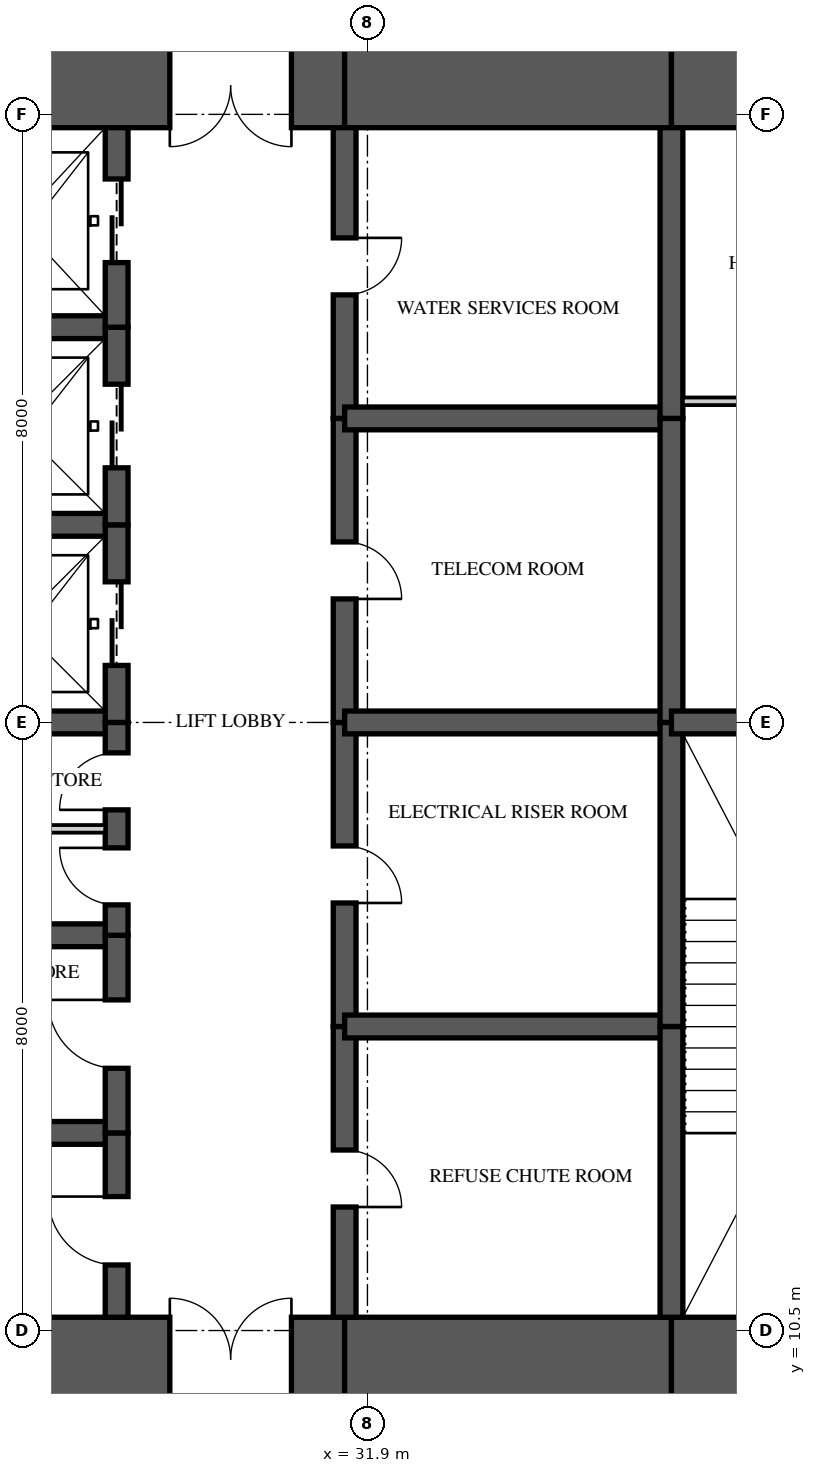
"""IFC4 building model, lengths in metres.
Left out: names, types, materials, properties, quantities, classifications, styles, units other than length and angle.
Written with IfcOpenShell. Run it as: python <this file> out.ifc"""

import sys

from ifc_helpers import new_model, si_unit, direction, frame, frame_2d, origin, place, context, subcontext, project, spatial, rectangle, extrude, element, fill, save


model = new_model("IFC4")
c1 = context("Model", 3, precision=1e-05, world=origin(), true_north=direction((0.0, 1.0)))
c2 = subcontext(c1, "Body", "Model", "MODEL_VIEW")
j1 = project(units=[si_unit("LENGTHUNIT", "METRE"), si_unit("PLANEANGLEUNIT", "RADIAN")], contexts=[c1])
p1 = place(None, origin())
s1 = spatial("IfcSite", under=j1, at=p1, CompositionType="ELEMENT")
p2 = place(p1, origin())
s2 = spatial("IfcBuilding", under=s1, at=p2, CompositionType="ELEMENT")
p3 = place(p2, frame((0.0, 0.0, 231.95)))
s3 = spatial("IfcBuildingStorey", under=s2, at=p3, CompositionType="ELEMENT", Elevation=231.95)
p4 = place(p3, frame((26.0, 10.125, 0.0), z_axis=(0.0, 0.0, 1.0), x_axis=(1.0, 0.0, 0.0)))
e1 = element("IfcWall", 1, at=p4, inside=s3, PredefinedType="SHEAR", context=c2, shape_type="SweptSolid", body=[
    extrude(rectangle(XDim=5.6, YDim=1.1, at=frame_2d((2.8, 0.0))), origin(), (0.0, 0.0, 1.0), 3.5),
])
p5 = place(p4, frame((3.3, 0.0, 0.0)))
e2 = element("IfcOpeningElement", 2, at=p5, cuts=e1, PredefinedType="OPENING", context=c2, shape_type="SweptSolid", body=[
    extrude(rectangle(XDim=1.6, YDim=2.1, at=frame_2d((0.8, 1.05))), frame((0.0, 0.56, 0.0), z_axis=(0.0, -1.0, 0.0), x_axis=(1.0, 0.0, 0.0)), (0.0, 0.0, 1.0), 1.12),
])
p6 = place(p3, frame((31.6, 10.125, 0.0), z_axis=(0.0, 0.0, 1.0), x_axis=(1.0, 0.0, 0.0)))
e3 = element("IfcWall", 3, at=p6, inside=s3, PredefinedType="SHEAR", context=c2, shape_type="SweptSolid", body=[
    extrude(rectangle(XDim=4.3, YDim=1.1, at=frame_2d((2.15, 0.0))), origin(), (0.0, 0.0, 1.0), 3.5),
])
p7 = place(p3, frame((35.9, 10.125, 0.0), z_axis=(0.0, 0.0, 1.0), x_axis=(1.0, 0.0, 0.0)))
e4 = element("IfcWall", 4, at=p7, inside=s3, PredefinedType="SHEAR", context=c2, shape_type="SweptSolid", body=[
    extrude(rectangle(XDim=8.175, YDim=1.1, at=frame_2d((4.087, 0.0))), origin(), (0.0, 0.0, 1.0), 3.5),
])
p8 = place(p7, frame((2.7, 0.0, 0.0)))
e5 = element("IfcOpeningElement", 5, at=p8, cuts=e4, PredefinedType="OPENING", context=c2, shape_type="SweptSolid", body=[
    extrude(rectangle(XDim=1.0, YDim=2.1, at=frame_2d((0.5, 1.05))), frame((0.0, 0.56, 0.0), z_axis=(0.0, -1.0, 0.0), x_axis=(1.0, 0.0, 0.0)), (0.0, 0.0, 1.0), 1.12),
])
p9 = place(p3, frame((44.075, 26.875, 0.0), z_axis=(0.0, 0.0, 1.0), x_axis=(-1.0, 0.0, 0.0)))
e6 = element("IfcWall", 6, at=p9, inside=s3, PredefinedType="SHEAR", context=c2, shape_type="SweptSolid", body=[
    extrude(rectangle(XDim=8.175, YDim=1.1, at=frame_2d((4.087, 0.0))), origin(), (0.0, 0.0, 1.0), 3.5),
])
p10 = place(p9, frame((5.575, 0.0, 0.0)))
e7 = element("IfcOpeningElement", 7, at=p10, cuts=e6, PredefinedType="OPENING", context=c2, shape_type="SweptSolid", body=[
    extrude(rectangle(XDim=0.9, YDim=2.1, at=frame_2d((0.45, 1.05))), frame((0.0, 0.56, 0.0), z_axis=(0.0, -1.0, 0.0), x_axis=(1.0, 0.0, 0.0)), (0.0, 0.0, 1.0), 1.12),
])
p11 = place(p3, frame((35.9, 26.875, 0.0), z_axis=(0.0, 0.0, 1.0), x_axis=(-1.0, 0.0, 0.0)))
e8 = element("IfcWall", 8, at=p11, inside=s3, PredefinedType="SHEAR", context=c2, shape_type="SweptSolid", body=[
    extrude(rectangle(XDim=4.3, YDim=1.1, at=frame_2d((2.15, 0.0))), origin(), (0.0, 0.0, 1.0), 3.5),
])
p12 = place(p3, frame((31.6, 26.875, 0.0), z_axis=(0.0, 0.0, 1.0), x_axis=(-1.0, 0.0, 0.0)))
e9 = element("IfcWall", 9, at=p12, inside=s3, PredefinedType="SHEAR", context=c2, shape_type="SweptSolid", body=[
    extrude(rectangle(XDim=5.6, YDim=1.1, at=frame_2d((2.8, 0.0))), origin(), (0.0, 0.0, 1.0), 3.5),
])
p13 = place(p12, frame((0.7, 0.0, 0.0)))
e10 = element("IfcOpeningElement", 10, at=p13, cuts=e9, PredefinedType="OPENING", context=c2, shape_type="SweptSolid", body=[
    extrude(rectangle(XDim=1.6, YDim=2.1, at=frame_2d((0.8, 1.05))), frame((0.0, 0.56, 0.0), z_axis=(0.0, -1.0, 0.0), x_axis=(1.0, 0.0, 0.0)), (0.0, 0.0, 1.0), 1.12),
])
p14 = place(p3, frame((28.6, 10.675, 0.0), z_axis=(0.0, 0.0, 1.0), x_axis=(0.0, 1.0, 0.0)))
e11 = element("IfcWall", 11, at=p14, inside=s3, PredefinedType="SHEAR", context=c2, shape_type="SweptSolid", body=[
    extrude(rectangle(XDim=2.425, YDim=0.3, at=frame_2d((1.212, 0.0))), origin(), (0.0, 0.0, 1.0), 3.5),
])
p15 = place(p14, frame((0.688, 0.0, 0.0)))
e12 = element("IfcOpeningElement", 12, at=p15, cuts=e11, PredefinedType="OPENING", context=c2, shape_type="SweptSolid", body=[
    extrude(rectangle(XDim=0.9, YDim=2.1, at=frame_2d((0.45, 1.05))), frame((0.0, 0.16, 0.0), z_axis=(0.0, -1.0, 0.0), x_axis=(1.0, 0.0, 0.0)), (0.0, 0.0, 1.0), 0.32),
])
p16 = place(p3, frame((28.6, 13.1, 0.0), z_axis=(0.0, 0.0, 1.0), x_axis=(0.0, 1.0, 0.0)))
e13 = element("IfcWall", 13, at=p16, inside=s3, PredefinedType="SHEAR", context=c2, shape_type="SweptSolid", body=[
    extrude(rectangle(XDim=2.6, YDim=0.3, at=frame_2d((1.3, 0.0))), origin(), (0.0, 0.0, 1.0), 3.5),
])
p17 = place(p16, frame((0.85, 0.0, 0.0)))
e14 = element("IfcOpeningElement", 14, at=p17, cuts=e13, PredefinedType="OPENING", context=c2, shape_type="SweptSolid", body=[
    extrude(rectangle(XDim=0.9, YDim=2.1, at=frame_2d((0.45, 1.05))), frame((0.0, 0.16, 0.0), z_axis=(0.0, -1.0, 0.0), x_axis=(1.0, 0.0, 0.0)), (0.0, 0.0, 1.0), 0.32),
])
p18 = place(p3, frame((28.6, 15.7, 0.0), z_axis=(0.0, 0.0, 1.0), x_axis=(0.0, 1.0, 0.0)))
e15 = element("IfcWall", 15, at=p18, inside=s3, PredefinedType="SHEAR", context=c2, shape_type="SweptSolid", body=[
    extrude(rectangle(XDim=2.8, YDim=0.3, at=frame_2d((1.4, 0.0))), origin(), (0.0, 0.0, 1.0), 3.5),
])
p19 = place(p18, frame((0.4, 0.0, 0.0)))
e16 = element("IfcOpeningElement", 16, at=p19, cuts=e15, PredefinedType="OPENING", context=c2, shape_type="SweptSolid", body=[
    extrude(rectangle(XDim=0.75, YDim=2.1, at=frame_2d((0.375, 1.05))), frame((0.0, 0.16, 0.0), z_axis=(0.0, -1.0, 0.0), x_axis=(1.0, 0.0, 0.0)), (0.0, 0.0, 1.0), 0.32),
])
p20 = place(p18, frame((1.65, 0.0, 0.0)))
e17 = element("IfcOpeningElement", 17, at=p20, cuts=e15, PredefinedType="OPENING", context=c2, shape_type="SweptSolid", body=[
    extrude(rectangle(XDim=0.75, YDim=2.1, at=frame_2d((0.375, 1.05))), frame((0.0, 0.16, 0.0), z_axis=(0.0, -1.0, 0.0), x_axis=(1.0, 0.0, 0.0)), (0.0, 0.0, 1.0), 0.32),
])
p21 = place(p3, frame((28.6, 18.5, 0.0), z_axis=(0.0, 0.0, 1.0), x_axis=(0.0, 1.0, 0.0)))
e18 = element("IfcWall", 18, at=p21, inside=s3, PredefinedType="SHEAR", context=c2, shape_type="SweptSolid", body=[
    extrude(rectangle(XDim=2.6, YDim=0.3, at=frame_2d((1.3, 0.0))), origin(), (0.0, 0.0, 1.0), 3.5),
])
p22 = place(p21, frame((0.75, 0.0, 0.0)))
e19 = element("IfcOpeningElement", 19, at=p22, cuts=e18, PredefinedType="OPENING", context=c2, shape_type="SweptSolid", body=[
    extrude(rectangle(XDim=1.1, YDim=2.1, at=frame_2d((0.55, 1.05))), frame((0.0, 0.16, 0.0), z_axis=(0.0, -1.0, 0.0), x_axis=(1.0, 0.0, 0.0)), (0.0, 0.0, 1.0), 0.32),
])
p23 = place(p3, frame((28.6, 21.1, 0.0), z_axis=(0.0, 0.0, 1.0), x_axis=(0.0, 1.0, 0.0)))
e20 = element("IfcWall", 20, at=p23, inside=s3, PredefinedType="SHEAR", context=c2, shape_type="SweptSolid", body=[
    extrude(rectangle(XDim=2.6, YDim=0.3, at=frame_2d((1.3, 0.0))), origin(), (0.0, 0.0, 1.0), 3.5),
])
p24 = place(p23, frame((0.75, 0.0, 0.0)))
e21 = element("IfcOpeningElement", 21, at=p24, cuts=e20, PredefinedType="OPENING", context=c2, shape_type="SweptSolid", body=[
    extrude(rectangle(XDim=1.1, YDim=2.1, at=frame_2d((0.55, 1.05))), frame((0.0, 0.16, 0.0), z_axis=(0.0, -1.0, 0.0), x_axis=(1.0, 0.0, 0.0)), (0.0, 0.0, 1.0), 0.32),
])
p25 = place(p3, frame((28.6, 23.7, 0.0), z_axis=(0.0, 0.0, 1.0), x_axis=(0.0, 1.0, 0.0)))
e22 = element("IfcWall", 22, at=p25, inside=s3, PredefinedType="SHEAR", context=c2, shape_type="SweptSolid", body=[
    extrude(rectangle(XDim=2.625, YDim=0.3, at=frame_2d((1.312, 0.0))), origin(), (0.0, 0.0, 1.0), 3.5),
])
p26 = place(p25, frame((0.85, 0.0, 0.0)))
e23 = element("IfcOpeningElement", 23, at=p26, cuts=e22, PredefinedType="OPENING", context=c2, shape_type="SweptSolid", body=[
    extrude(rectangle(XDim=1.1, YDim=2.1, at=frame_2d((0.55, 1.05))), frame((0.0, 0.16, 0.0), z_axis=(0.0, -1.0, 0.0), x_axis=(1.0, 0.0, 0.0)), (0.0, 0.0, 1.0), 0.32),
])
p27 = place(p3, frame((31.6, 10.675, 0.0), z_axis=(0.0, 0.0, 1.0), x_axis=(0.0, 1.0, 0.0)))
e24 = element("IfcWall", 24, at=p27, inside=s3, PredefinedType="SHEAR", context=c2, shape_type="SweptSolid", body=[
    extrude(rectangle(XDim=3.825, YDim=0.3, at=frame_2d((1.913, 0.0))), origin(), (0.0, 0.0, 1.0), 3.5),
])
p28 = place(p27, frame((1.45, 0.0, 0.0)))
e25 = element("IfcOpeningElement", 25, at=p28, cuts=e24, PredefinedType="OPENING", context=c2, shape_type="SweptSolid", body=[
    extrude(rectangle(XDim=0.75, YDim=2.1, at=frame_2d((0.375, 1.05))), frame((0.0, 0.16, 0.0), z_axis=(0.0, -1.0, 0.0), x_axis=(1.0, 0.0, 0.0)), (0.0, 0.0, 1.0), 0.32),
])
p29 = place(p3, frame((31.6, 14.5, 0.0), z_axis=(0.0, 0.0, 1.0), x_axis=(0.0, 1.0, 0.0)))
e26 = element("IfcWall", 26, at=p29, inside=s3, PredefinedType="SHEAR", context=c2, shape_type="SweptSolid", body=[
    extrude(rectangle(XDim=4.0, YDim=0.3, at=frame_2d((2.0, 0.0))), origin(), (0.0, 0.0, 1.0), 3.5),
])
p30 = place(p29, frame((1.625, 0.0, 0.0)))
e27 = element("IfcOpeningElement", 27, at=p30, cuts=e26, PredefinedType="OPENING", context=c2, shape_type="SweptSolid", body=[
    extrude(rectangle(XDim=0.75, YDim=2.1, at=frame_2d((0.375, 1.05))), frame((0.0, 0.16, 0.0), z_axis=(0.0, -1.0, 0.0), x_axis=(1.0, 0.0, 0.0)), (0.0, 0.0, 1.0), 0.32),
])
p31 = place(p3, frame((31.6, 18.5, 0.0), z_axis=(0.0, 0.0, 1.0), x_axis=(0.0, 1.0, 0.0)))
e28 = element("IfcWall", 28, at=p31, inside=s3, PredefinedType="SHEAR", context=c2, shape_type="SweptSolid", body=[
    extrude(rectangle(XDim=4.0, YDim=0.3, at=frame_2d((2.0, 0.0))), origin(), (0.0, 0.0, 1.0), 3.5),
])
p32 = place(p31, frame((1.625, 0.0, 0.0)))
e29 = element("IfcOpeningElement", 29, at=p32, cuts=e28, PredefinedType="OPENING", context=c2, shape_type="SweptSolid", body=[
    extrude(rectangle(XDim=0.75, YDim=2.1, at=frame_2d((0.375, 1.05))), frame((0.0, 0.16, 0.0), z_axis=(0.0, -1.0, 0.0), x_axis=(1.0, 0.0, 0.0)), (0.0, 0.0, 1.0), 0.32),
])
p33 = place(p3, frame((31.6, 22.5, 0.0), z_axis=(0.0, 0.0, 1.0), x_axis=(0.0, 1.0, 0.0)))
e30 = element("IfcWall", 30, at=p33, inside=s3, PredefinedType="SHEAR", context=c2, shape_type="SweptSolid", body=[
    extrude(rectangle(XDim=3.825, YDim=0.3, at=frame_2d((1.913, 0.0))), origin(), (0.0, 0.0, 1.0), 3.5),
])
p34 = place(p33, frame((1.625, 0.0, 0.0)))
e31 = element("IfcOpeningElement", 31, at=p34, cuts=e30, PredefinedType="OPENING", context=c2, shape_type="SweptSolid", body=[
    extrude(rectangle(XDim=0.75, YDim=2.1, at=frame_2d((0.375, 1.05))), frame((0.0, 0.16, 0.0), z_axis=(0.0, -1.0, 0.0), x_axis=(1.0, 0.0, 0.0)), (0.0, 0.0, 1.0), 0.32),
])
p35 = place(p3, frame((35.9, 10.675, 0.0), z_axis=(0.0, 0.0, 1.0), x_axis=(0.0, 1.0, 0.0)))
e32 = element("IfcWall", 32, at=p35, inside=s3, PredefinedType="SHEAR", context=c2, shape_type="SweptSolid", body=[
    extrude(rectangle(XDim=3.825, YDim=0.3, at=frame_2d((1.913, 0.0))), origin(), (0.0, 0.0, 1.0), 3.5),
])
for number, where, z_axis, x_axis in (
    (33, (35.9, 14.5, 0.0), (0.0, 0.0, 1.0), (0.0, 1.0, 0.0)),
    (34, (35.9, 18.5, 0.0), (0.0, 0.0, 1.0), (0.0, 1.0, 0.0)),
):
    element("IfcWall", number, at=place(p3, frame(where, z_axis=z_axis, x_axis=x_axis)), inside=s3, PredefinedType="SHEAR", context=c2, shape_type="SweptSolid", body=[
        extrude(rectangle(XDim=4.0, YDim=0.3, at=frame_2d((2.0, 0.0))), origin(), (0.0, 0.0, 1.0), 3.5),
    ])
p36 = place(p3, frame((35.9, 22.5, 0.0), z_axis=(0.0, 0.0, 1.0), x_axis=(0.0, 1.0, 0.0)))
e35 = element("IfcWall", 35, at=p36, inside=s3, PredefinedType="SHEAR", context=c2, shape_type="SweptSolid", body=[
    extrude(rectangle(XDim=3.825, YDim=0.3, at=frame_2d((1.913, 0.0))), origin(), (0.0, 0.0, 1.0), 3.5),
])
for number, where, z_axis, x_axis in (
    (36, (26.0, 13.1, 0.0), (0.0, 0.0, 1.0), (1.0, 0.0, 0.0)),
    (37, (26.0, 15.7, 0.0), (0.0, 0.0, 1.0), (1.0, 0.0, 0.0)),
    (38, (26.0, 18.5, 0.0), (0.0, 0.0, 1.0), (1.0, 0.0, 0.0)),
    (39, (26.0, 21.1, 0.0), (0.0, 0.0, 1.0), (1.0, 0.0, 0.0)),
    (40, (26.0, 23.7, 0.0), (0.0, 0.0, 1.0), (1.0, 0.0, 0.0)),
):
    element("IfcWall", number, at=place(p3, frame(where, z_axis=z_axis, x_axis=x_axis)), inside=s3, PredefinedType="SHEAR", context=c2, shape_type="SweptSolid", body=[
        extrude(rectangle(XDim=2.6, YDim=0.3, at=frame_2d((1.3, 0.0))), origin(), (0.0, 0.0, 1.0), 3.5),
    ])
for number, where, z_axis, x_axis in (
    (41, (31.6, 14.5, 0.0), (0.0, 0.0, 1.0), (1.0, 0.0, 0.0)),
    (42, (31.6, 18.5, 0.0), (0.0, 0.0, 1.0), (1.0, 0.0, 0.0)),
    (43, (31.6, 22.5, 0.0), (0.0, 0.0, 1.0), (1.0, 0.0, 0.0)),
):
    element("IfcWall", number, at=place(p3, frame(where, z_axis=z_axis, x_axis=x_axis)), inside=s3, PredefinedType="SHEAR", context=c2, shape_type="SweptSolid", body=[
        extrude(rectangle(XDim=4.3, YDim=0.3, at=frame_2d((2.15, 0.0))), origin(), (0.0, 0.0, 1.0), 3.5),
    ])
p37 = place(p3, frame((35.9, 18.5, 0.0), z_axis=(0.0, 0.0, 1.0), x_axis=(1.0, 0.0, 0.0)))
e44 = element("IfcWall", 44, at=p37, inside=s3, PredefinedType="SHEAR", context=c2, shape_type="SweptSolid", body=[
    extrude(rectangle(XDim=4.3, YDim=0.3, at=frame_2d((2.15, 0.0))), origin(), (0.0, 0.0, 1.0), 3.5),
])
p38 = place(p3, frame((36.05, 22.725, 0.0), z_axis=(0.0, 0.0, 1.0), x_axis=(1.0, 0.0, 0.0)))
e45 = element("IfcWall", 45, at=p38, inside=s3, PredefinedType="PARTITIONING", context=c2, shape_type="SweptSolid", body=[
    extrude(rectangle(XDim=4.0, YDim=0.1, at=frame_2d((2.0, 0.0))), origin(), (0.0, 0.0, 1.0), 3.26),
])
p39 = place(p38, frame((1.55, 0.0, 0.0)))
e46 = element("IfcOpeningElement", 46, at=p39, cuts=e45, PredefinedType="OPENING", context=c2, shape_type="SweptSolid", body=[
    extrude(rectangle(XDim=0.9, YDim=2.1, at=frame_2d((0.45, 1.05))), frame((0.0, 0.06, 0.0), z_axis=(0.0, -1.0, 0.0), x_axis=(1.0, 0.0, 0.0)), (0.0, 0.0, 1.0), 0.12),
])
p40 = place(p3, frame((26.15, 17.1, 0.0), z_axis=(0.0, 0.0, 1.0), x_axis=(1.0, 0.0, 0.0)))
e47 = element("IfcWall", 47, at=p40, inside=s3, PredefinedType="PARTITIONING", context=c2, shape_type="SweptSolid", body=[
    extrude(rectangle(XDim=2.3, YDim=0.1, at=frame_2d((1.15, 0.0))), origin(), (0.0, 0.0, 1.0), 3.26),
])
p41 = place(p22, origin())
e48 = element("IfcDoor", 48, at=p41, inside=s3, OperationType="SLIDING_TO_LEFT", PredefinedType="DOOR", context=c2, shape_type="SweptSolid", body=[
    extrude(rectangle(XDim=1.1, YDim=2.1, at=frame_2d((0.55, 1.05))), frame((0.0, 0.025, 0.0), z_axis=(0.0, -1.0, 0.0), x_axis=(1.0, 0.0, 0.0)), (0.0, 0.0, 1.0), 0.05),
])
fill(e19, e48)
p42 = place(p24, origin())
e49 = element("IfcDoor", 49, at=p42, inside=s3, OperationType="SLIDING_TO_LEFT", PredefinedType="DOOR", context=c2, shape_type="SweptSolid", body=[
    extrude(rectangle(XDim=1.1, YDim=2.1, at=frame_2d((0.55, 1.05))), frame((0.0, 0.025, 0.0), z_axis=(0.0, -1.0, 0.0), x_axis=(1.0, 0.0, 0.0)), (0.0, 0.0, 1.0), 0.05),
])
fill(e21, e49)
p43 = place(p26, origin())
e50 = element("IfcDoor", 50, at=p43, inside=s3, OperationType="SLIDING_TO_LEFT", PredefinedType="DOOR", context=c2, shape_type="SweptSolid", body=[
    extrude(rectangle(XDim=1.1, YDim=2.1, at=frame_2d((0.55, 1.05))), frame((0.0, 0.025, 0.0), z_axis=(0.0, -1.0, 0.0), x_axis=(1.0, 0.0, 0.0)), (0.0, 0.0, 1.0), 0.05),
])
fill(e23, e50)
p44 = place(p15, origin())
e51 = element("IfcDoor", 51, at=p44, inside=s3, OperationType="SINGLE_SWING_RIGHT", PredefinedType="DOOR", context=c2, shape_type="SweptSolid", body=[
    extrude(rectangle(XDim=0.9, YDim=2.1, at=frame_2d((0.45, 1.05))), frame((0.0, 0.025, 0.0), z_axis=(0.0, -1.0, 0.0), x_axis=(1.0, 0.0, 0.0)), (0.0, 0.0, 1.0), 0.05),
])
fill(e12, e51)
p45 = place(p17, origin())
e52 = element("IfcDoor", 52, at=p45, inside=s3, OperationType="SINGLE_SWING_RIGHT", PredefinedType="DOOR", context=c2, shape_type="SweptSolid", body=[
    extrude(rectangle(XDim=0.9, YDim=2.1, at=frame_2d((0.45, 1.05))), frame((0.0, 0.025, 0.0), z_axis=(0.0, -1.0, 0.0), x_axis=(1.0, 0.0, 0.0)), (0.0, 0.0, 1.0), 0.05),
])
fill(e14, e52)
p46 = place(p19, origin())
e53 = element("IfcDoor", 53, at=p46, inside=s3, OperationType="SINGLE_SWING_RIGHT", PredefinedType="DOOR", context=c2, shape_type="SweptSolid", body=[
    extrude(rectangle(XDim=0.75, YDim=2.1, at=frame_2d((0.375, 1.05))), frame((0.0, 0.025, 0.0), z_axis=(0.0, -1.0, 0.0), x_axis=(1.0, 0.0, 0.0)), (0.0, 0.0, 1.0), 0.05),
])
fill(e16, e53)
p47 = place(p20, origin())
e54 = element("IfcDoor", 54, at=p47, inside=s3, OperationType="SINGLE_SWING_LEFT", PredefinedType="DOOR", context=c2, shape_type="SweptSolid", body=[
    extrude(rectangle(XDim=0.75, YDim=2.1, at=frame_2d((0.375, 1.05))), frame((0.0, 0.025, 0.0), z_axis=(0.0, -1.0, 0.0), x_axis=(1.0, 0.0, 0.0)), (0.0, 0.0, 1.0), 0.05),
])
fill(e17, e54)
p48 = place(p5, origin())
e55 = element("IfcDoor", 55, at=p48, inside=s3, OperationType="DOUBLE_DOOR_SINGLE_SWING", PredefinedType="DOOR", context=c2, shape_type="SweptSolid", body=[
    extrude(rectangle(XDim=1.6, YDim=2.1, at=frame_2d((0.8, 1.05))), frame((0.0, 0.025, 0.0), z_axis=(0.0, -1.0, 0.0), x_axis=(1.0, 0.0, 0.0)), (0.0, 0.0, 1.0), 0.05),
])
fill(e2, e55)
p49 = place(p13, origin())
e56 = element("IfcDoor", 56, at=p49, inside=s3, OperationType="DOUBLE_DOOR_SINGLE_SWING", PredefinedType="DOOR", context=c2, shape_type="SweptSolid", body=[
    extrude(rectangle(XDim=1.6, YDim=2.1, at=frame_2d((0.8, 1.05))), frame((0.0, 0.025, 0.0), z_axis=(0.0, -1.0, 0.0), x_axis=(1.0, 0.0, 0.0)), (0.0, 0.0, 1.0), 0.05),
])
fill(e10, e56)
p50 = place(p28, frame((0.75, 0.0, 0.0), z_axis=(0.0, 0.0, 1.0), x_axis=(-1.0, 0.0, 0.0)))
e57 = element("IfcDoor", 57, at=p50, inside=s3, OperationType="SINGLE_SWING_RIGHT", PredefinedType="DOOR", context=c2, shape_type="SweptSolid", body=[
    extrude(rectangle(XDim=0.75, YDim=2.1, at=frame_2d((0.375, 1.05))), frame((0.0, 0.025, 0.0), z_axis=(0.0, -1.0, 0.0), x_axis=(1.0, 0.0, 0.0)), (0.0, 0.0, 1.0), 0.05),
])
fill(e25, e57)
p51 = place(p30, frame((0.75, 0.0, 0.0), z_axis=(0.0, 0.0, 1.0), x_axis=(-1.0, 0.0, 0.0)))
e58 = element("IfcDoor", 58, at=p51, inside=s3, OperationType="SINGLE_SWING_RIGHT", PredefinedType="DOOR", context=c2, shape_type="SweptSolid", body=[
    extrude(rectangle(XDim=0.75, YDim=2.1, at=frame_2d((0.375, 1.05))), frame((0.0, 0.025, 0.0), z_axis=(0.0, -1.0, 0.0), x_axis=(1.0, 0.0, 0.0)), (0.0, 0.0, 1.0), 0.05),
])
fill(e27, e58)
p52 = place(p32, frame((0.75, 0.0, 0.0), z_axis=(0.0, 0.0, 1.0), x_axis=(-1.0, 0.0, 0.0)))
e59 = element("IfcDoor", 59, at=p52, inside=s3, OperationType="SINGLE_SWING_RIGHT", PredefinedType="DOOR", context=c2, shape_type="SweptSolid", body=[
    extrude(rectangle(XDim=0.75, YDim=2.1, at=frame_2d((0.375, 1.05))), frame((0.0, 0.025, 0.0), z_axis=(0.0, -1.0, 0.0), x_axis=(1.0, 0.0, 0.0)), (0.0, 0.0, 1.0), 0.05),
])
fill(e29, e59)
p53 = place(p34, frame((0.75, 0.0, 0.0), z_axis=(0.0, 0.0, 1.0), x_axis=(-1.0, 0.0, 0.0)))
e60 = element("IfcDoor", 60, at=p53, inside=s3, OperationType="SINGLE_SWING_LEFT", PredefinedType="DOOR", context=c2, shape_type="SweptSolid", body=[
    extrude(rectangle(XDim=0.75, YDim=2.1, at=frame_2d((0.375, 1.05))), frame((0.0, 0.025, 0.0), z_axis=(0.0, -1.0, 0.0), x_axis=(1.0, 0.0, 0.0)), (0.0, 0.0, 1.0), 0.05),
])
fill(e31, e60)
save(model, sys.argv[1])
